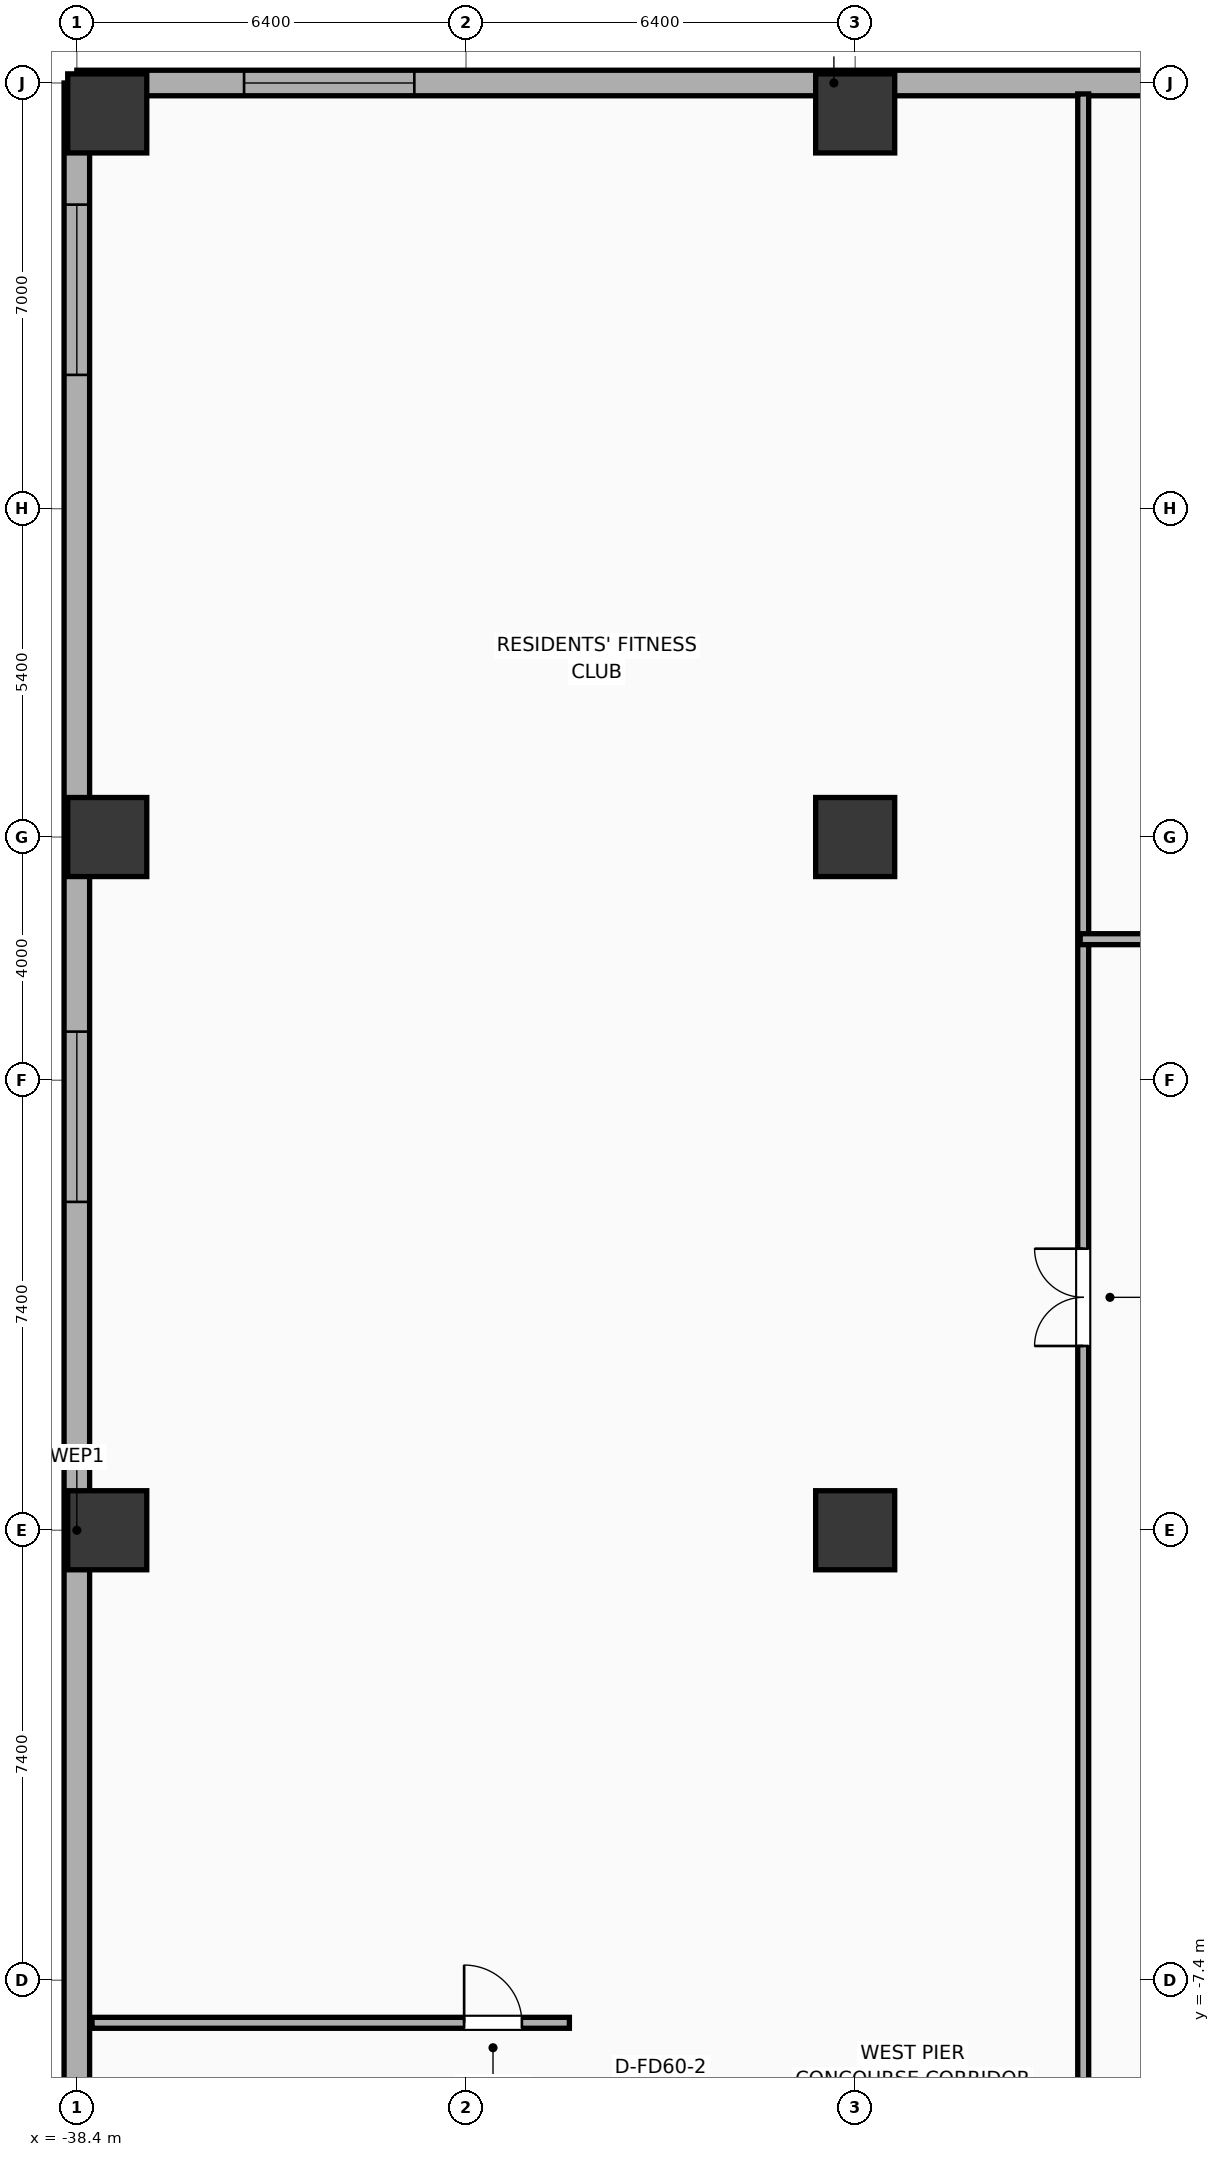
"""IFC4 building model, lengths in metres.
Left out: names, types, materials, properties, quantities, classifications, styles, units other than length and angle.
Written with IfcOpenShell. Run it as: python <this file> out.ifc"""

import sys

from ifc_helpers import new_model, si_unit, direction, frame, frame_2d, origin, origin_2d, place, context, subcontext, project, spatial, rectangle, extrude, element, fill, save


model = new_model("IFC4")
c1 = context("Model", 3, precision=1e-05, world=origin(), true_north=direction((0.0, 1.0)))
c2 = subcontext(c1, "Body", "Model", "MODEL_VIEW")
j1 = project(units=[si_unit("LENGTHUNIT", "METRE"), si_unit("PLANEANGLEUNIT", "RADIAN")], contexts=[c1])
p1 = place(None, origin())
s1 = spatial("IfcSite", under=j1, at=p1, CompositionType="ELEMENT")
p2 = place(p1, origin())
s2 = spatial("IfcBuilding", under=s1, at=p2, CompositionType="ELEMENT")
p3 = place(p2, frame((0.0, 0.0, 10.4)))
s3 = spatial("IfcBuildingStorey", under=s2, at=p3, CompositionType="ELEMENT", Elevation=10.4)
for number, where, z_axis, x_axis in (
    (1, (-37.9, 0.0, 0.0), (0.0, 0.0, 1.0), (1.0, 0.0, 0.0)),
    (2, (-37.9, 11.4, 0.0), (0.0, 0.0, 1.0), (1.0, 0.0, 0.0)),
    (3, (-37.9, 23.3, 0.0), (0.0, 0.0, 1.0), (1.0, 0.0, 0.0)),
    (4, (-25.6, 0.0, 0.0), (0.0, 0.0, 1.0), (1.0, 0.0, 0.0)),
    (5, (-25.6, 11.4, 0.0), (0.0, 0.0, 1.0), (1.0, 0.0, 0.0)),
    (6, (-25.6, 23.3, 0.0), (0.0, 0.0, 1.0), (1.0, 0.0, 0.0)),
):
    element("IfcColumn", number, at=place(p3, frame(where, z_axis=z_axis, x_axis=x_axis)), inside=s3, PredefinedType="COLUMN", context=c2, shape_type="SweptSolid", body=[
        extrude(rectangle(XDim=1.3, YDim=1.3, at=origin_2d()), origin(), (0.0, 0.0, 1.0), 5.2),
    ])
p4 = place(p3, frame((-13.5, 23.8, 0.0), z_axis=(0.0, 0.0, 1.0), x_axis=(-1.0, 0.0, 0.0)))
e7 = element("IfcWall", 7, at=p4, inside=s3, PredefinedType="ELEMENTEDWALL", context=c2, shape_type="SweptSolid", body=[
    extrude(rectangle(XDim=24.9, YDim=0.42, at=frame_2d((12.45, 0.0))), origin(), (0.0, 0.0, 1.0), 4.92),
])
p5 = place(p4, frame((2.75, 0.0, 0.65)))
e8 = element("IfcOpeningElement", 8, at=p5, cuts=e7, PredefinedType="OPENING", context=c2, shape_type="SweptSolid", body=[
    extrude(rectangle(XDim=2.8, YDim=2.6, at=frame_2d((1.4, 1.3))), frame((0.0, 0.22, 0.0), z_axis=(0.0, -1.0, 0.0), x_axis=(1.0, 0.0, 0.0)), (0.0, 0.0, 1.0), 0.44),
])
p6 = place(p4, frame((19.35, 0.0, 0.65)))
e9 = element("IfcOpeningElement", 9, at=p6, cuts=e7, PredefinedType="OPENING", context=c2, shape_type="SweptSolid", body=[
    extrude(rectangle(XDim=2.8, YDim=2.6, at=frame_2d((1.4, 1.3))), frame((0.0, 0.22, 0.0), z_axis=(0.0, -1.0, 0.0), x_axis=(1.0, 0.0, 0.0)), (0.0, 0.0, 1.0), 0.44),
])
p7 = place(p3, frame((-38.4, 23.8, 0.0), z_axis=(0.0, 0.0, 1.0), x_axis=(0.0, -1.0, 0.0)))
e10 = element("IfcWall", 10, at=p7, inside=s3, PredefinedType="ELEMENTEDWALL", context=c2, shape_type="SweptSolid", body=[
    extrude(rectangle(XDim=47.6, YDim=0.42, at=frame_2d((23.8, 0.0))), origin(), (0.0, 0.0, 1.0), 4.92),
])
p8 = place(p7, frame((2.0, 0.0, 0.65)))
e11 = element("IfcOpeningElement", 11, at=p8, cuts=e10, PredefinedType="OPENING", context=c2, shape_type="SweptSolid", body=[
    extrude(rectangle(XDim=2.8, YDim=2.6, at=frame_2d((1.4, 1.3))), frame((0.0, 0.22, 0.0), z_axis=(0.0, -1.0, 0.0), x_axis=(1.0, 0.0, 0.0)), (0.0, 0.0, 1.0), 0.44),
])
p9 = place(p7, frame((15.6, 0.0, 0.65)))
e12 = element("IfcOpeningElement", 12, at=p9, cuts=e10, PredefinedType="OPENING", context=c2, shape_type="SweptSolid", body=[
    extrude(rectangle(XDim=2.8, YDim=2.6, at=frame_2d((1.4, 1.3))), frame((0.0, 0.22, 0.0), z_axis=(0.0, -1.0, 0.0), x_axis=(1.0, 0.0, 0.0)), (0.0, 0.0, 1.0), 0.44),
])
p10 = place(p7, frame((42.8, 0.0, 0.65)))
e13 = element("IfcOpeningElement", 13, at=p10, cuts=e10, PredefinedType="OPENING", context=c2, shape_type="SweptSolid", body=[
    extrude(rectangle(XDim=2.8, YDim=2.6, at=frame_2d((1.4, 1.3))), frame((0.0, 0.22, 0.0), z_axis=(0.0, -1.0, 0.0), x_axis=(1.0, 0.0, 0.0)), (0.0, 0.0, 1.0), 0.44),
])
p11 = place(p3, frame((-38.15, -8.1, 0.0), z_axis=(0.0, 0.0, 1.0), x_axis=(1.0, 0.0, 0.0)))
e14 = element("IfcWall", 14, at=p11, inside=s3, PredefinedType="PARTITIONING", context=c2, shape_type="SweptSolid", body=[
    extrude(rectangle(XDim=7.85, YDim=0.18, at=frame_2d((3.925, 0.0))), origin(), (0.0, 0.0, 1.0), 4.92),
])
p12 = place(p11, frame((6.119, 0.0, 0.0)))
e15 = element("IfcOpeningElement", 15, at=p12, cuts=e14, PredefinedType="OPENING", context=c2, shape_type="SweptSolid", body=[
    extrude(rectangle(XDim=0.95, YDim=2.05, at=frame_2d((0.475, 1.025))), frame((0.0, 0.1, 0.0), z_axis=(0.0, -1.0, 0.0), x_axis=(1.0, 0.0, 0.0)), (0.0, 0.0, 1.0), 0.2),
])
p13 = place(p3, frame((-21.85, -10.5, 0.0), z_axis=(0.0, 0.0, 1.0), x_axis=(0.0, 1.0, 0.0)))
e16 = element("IfcWall", 16, at=p13, inside=s3, PredefinedType="PARTITIONING", context=c2, shape_type="SweptSolid", body=[
    extrude(rectangle(XDim=34.12, YDim=0.18, at=frame_2d((17.06, 0.0))), origin(), (0.0, 0.0, 1.0), 4.92),
])
p14 = place(p13, frame((13.531, 0.0, 0.0)))
e17 = element("IfcOpeningElement", 17, at=p14, cuts=e16, PredefinedType="OPENING", context=c2, shape_type="SweptSolid", body=[
    extrude(rectangle(XDim=1.6, YDim=2.05, at=frame_2d((0.8, 1.025))), frame((0.0, 0.1, 0.0), z_axis=(0.0, -1.0, 0.0), x_axis=(1.0, 0.0, 0.0)), (0.0, 0.0, 1.0), 0.2),
])
p15 = place(p3, frame((-21.9, 9.72, 0.0), z_axis=(0.0, 0.0, 1.0), x_axis=(1.0, 0.0, 0.0)))
e18 = element("IfcWall", 18, at=p15, inside=s3, PredefinedType="PARTITIONING", context=c2, shape_type="SweptSolid", body=[
    extrude(rectangle(XDim=8.38, YDim=0.18, at=frame_2d((4.19, 0.0))), origin(), (0.0, 0.0, 1.0), 4.92),
])
p16 = place(p15, frame((3.39, 0.0, 0.0)))
e19 = element("IfcOpeningElement", 19, at=p16, cuts=e18, PredefinedType="OPENING", context=c2, shape_type="SweptSolid", body=[
    extrude(rectangle(XDim=1.6, YDim=2.05, at=frame_2d((0.8, 1.025))), frame((0.0, 0.1, 0.0), z_axis=(0.0, -1.0, 0.0), x_axis=(1.0, 0.0, 0.0)), (0.0, 0.0, 1.0), 0.2),
])
p17 = place(p6, origin())
e20 = element("IfcWindow", 20, at=p17, inside=s3, PartitioningType="SINGLE_PANEL", PredefinedType="WINDOW", context=c2, shape_type="SweptSolid", body=[
    extrude(rectangle(XDim=2.8, YDim=2.6, at=frame_2d((1.4, 1.3))), frame((0.0, 0.03, 0.0), z_axis=(0.0, -1.0, 0.0), x_axis=(1.0, 0.0, 0.0)), (0.0, 0.0, 1.0), 0.06),
])
fill(e9, e20)
p18 = place(p8, origin())
e21 = element("IfcWindow", 21, at=p18, inside=s3, PartitioningType="SINGLE_PANEL", PredefinedType="WINDOW", context=c2, shape_type="SweptSolid", body=[
    extrude(rectangle(XDim=2.8, YDim=2.6, at=frame_2d((1.4, 1.3))), frame((0.0, 0.03, 0.0), z_axis=(0.0, -1.0, 0.0), x_axis=(1.0, 0.0, 0.0)), (0.0, 0.0, 1.0), 0.06),
])
fill(e11, e21)
p19 = place(p9, origin())
e22 = element("IfcWindow", 22, at=p19, inside=s3, PartitioningType="SINGLE_PANEL", PredefinedType="WINDOW", context=c2, shape_type="SweptSolid", body=[
    extrude(rectangle(XDim=2.8, YDim=2.6, at=frame_2d((1.4, 1.3))), frame((0.0, 0.03, 0.0), z_axis=(0.0, -1.0, 0.0), x_axis=(1.0, 0.0, 0.0)), (0.0, 0.0, 1.0), 0.06),
])
fill(e12, e22)
p20 = place(p12, origin())
e23 = element("IfcDoor", 23, at=p20, inside=s3, OperationType="SINGLE_SWING_LEFT", PredefinedType="DOOR", context=c2, shape_type="SweptSolid", body=[
    extrude(rectangle(XDim=0.95, YDim=2.05, at=frame_2d((0.475, 1.025))), frame((0.0, 0.025, 0.0), z_axis=(0.0, -1.0, 0.0), x_axis=(1.0, 0.0, 0.0)), (0.0, 0.0, 1.0), 0.05),
])
fill(e15, e23)
p21 = place(p14, origin())
e24 = element("IfcDoor", 24, at=p21, inside=s3, OperationType="DOUBLE_DOOR_SINGLE_SWING", PredefinedType="DOOR", context=c2, shape_type="SweptSolid", body=[
    extrude(rectangle(XDim=1.6, YDim=2.05, at=frame_2d((0.8, 1.025))), frame((0.0, 0.025, 0.0), z_axis=(0.0, -1.0, 0.0), x_axis=(1.0, 0.0, 0.0)), (0.0, 0.0, 1.0), 0.05),
])
fill(e17, e24)
save(model, sys.argv[1])
